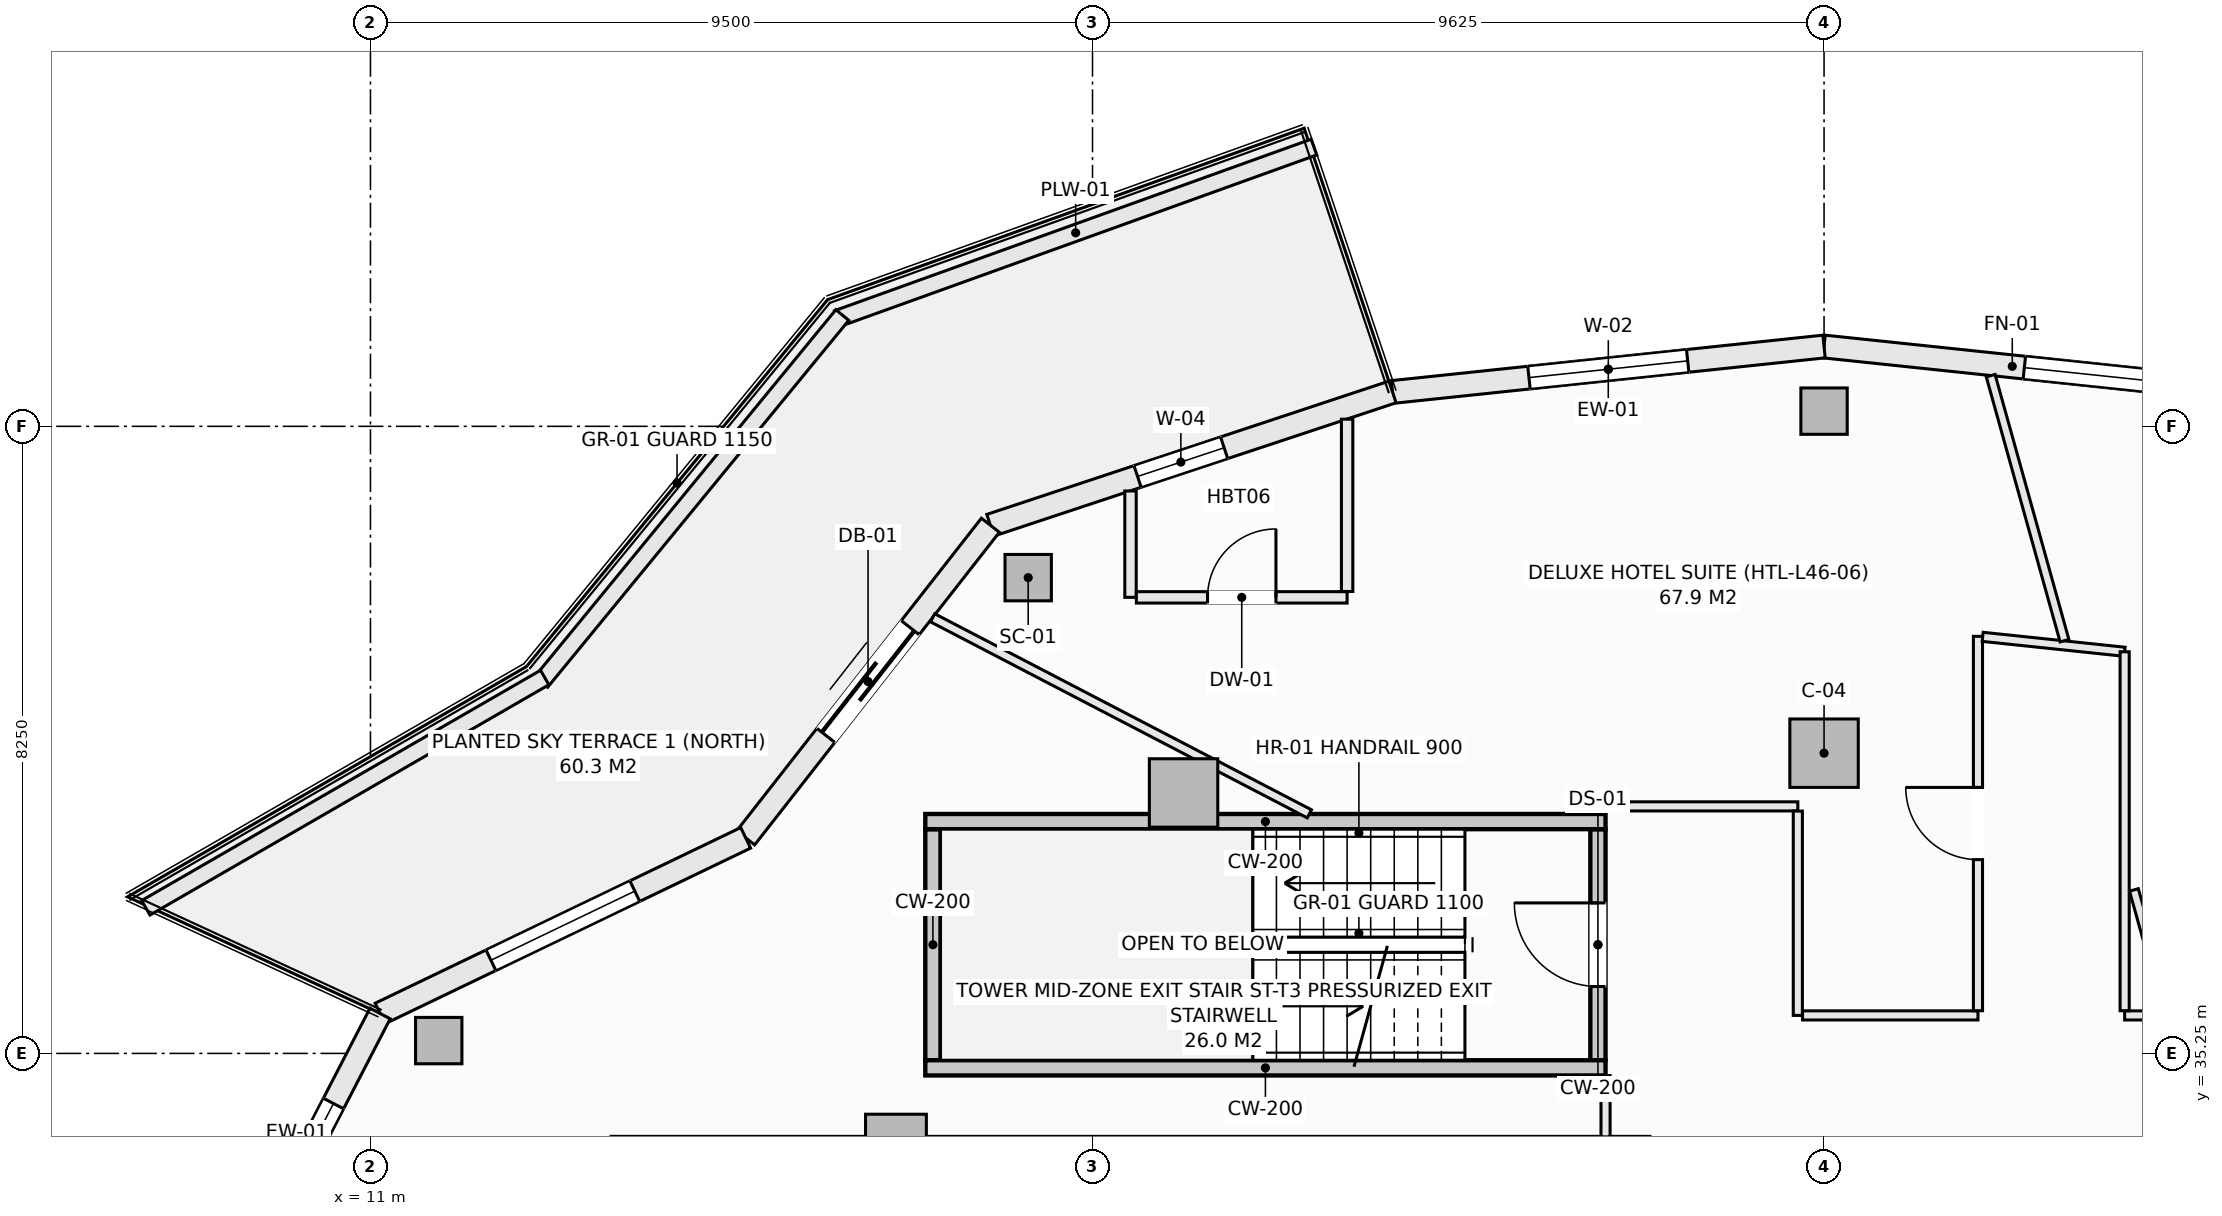
"""IFC4 building model, lengths in metres.
Left out: names, types, materials, properties, quantities, classifications, styles, units other than length and angle.
Written with IfcOpenShell. Run it as: python <this file> out.ifc"""

import sys

from ifc_helpers import new_model, si_unit, direction, frame, frame_2d, origin, origin_2d, place, context, subcontext, project, spatial, rectangle, hollow_rectangle, extrude, element, fill, save


model = new_model("IFC4")
c1 = context("Model", 3, precision=1e-05, world=origin(), true_north=direction((0.0, 1.0)))
c2 = subcontext(c1, "Body", "Model", "MODEL_VIEW")
j1 = project(units=[si_unit("LENGTHUNIT", "METRE"), si_unit("PLANEANGLEUNIT", "RADIAN")], contexts=[c1])
p1 = place(None, origin())
s1 = spatial("IfcSite", under=j1, at=p1, CompositionType="ELEMENT")
p2 = place(p1, origin())
s2 = spatial("IfcBuilding", under=s1, at=p2, CompositionType="ELEMENT")
p3 = place(p2, frame((0.0, 0.0, 176.7)))
s3 = spatial("IfcBuildingStorey", under=s2, at=p3, CompositionType="ELEMENT", Elevation=176.7)
for number, where, z_axis, x_axis in (
    (1, (30.125, 43.7, -0.27), (0.0, 0.0, 1.0), (1.0, 0.0, 0.0)),
    (2, (19.654, 41.51, -0.27), (0.0, 0.0, 1.0), (1.0, 0.0, 0.0)),
    (3, (11.898, 35.419, -0.27), (0.0, 0.0, 1.0), (1.0, 0.0, 0.0)),
):
    element("IfcColumn", number, at=place(p3, frame(where, z_axis=z_axis, x_axis=x_axis)), inside=s3, PredefinedType="COLUMN", context=c2, shape_type="SweptSolid", body=[
        extrude(hollow_rectangle(XDim=0.61, YDim=0.61, WallThickness=0.025, at=origin_2d()), origin(), (0.0, 0.0, 1.0), 3.4),
    ])
for number, where, z_axis, x_axis in (
    (4, (30.125, 39.2, -0.27), (0.0, 0.0, 1.0), (1.0, 0.0, 0.0)),
    (5, (21.698, 38.677, -0.27), (0.0, 0.0, 1.0), (1.0, 0.0, 0.0)),
):
    element("IfcColumn", number, at=place(p3, frame(where, z_axis=z_axis, x_axis=x_axis)), inside=s3, PredefinedType="COLUMN", context=c2, shape_type="SweptSolid", body=[
        extrude(rectangle(XDim=0.9, YDim=0.9, at=origin_2d()), origin(), (0.0, 0.0, 1.0), 3.4),
    ])
p4 = place(p3, frame((17.914, 34.05, -0.27), z_axis=(0.0, 0.0, 1.0), x_axis=(1.0, 0.0, 0.0)))
e6 = element("IfcColumn", 6, at=p4, inside=s3, PredefinedType="PILASTER", context=c2, shape_type="SweptSolid", body=[
    extrude(rectangle(XDim=0.8, YDim=0.8, at=origin_2d()), origin(), (0.0, 0.0, 1.0), 3.4),
])
p5 = place(p3, frame((30.125, 44.55, 0.0), z_axis=(0.0, 0.0, 1.0), x_axis=(0.994496545245, -0.104769372887, 0.0)))
e7 = element("IfcWall", 7, at=p5, inside=s3, PredefinedType="SOLIDWALL", context=c2, shape_type="SweptSolid", body=[
    extrude(rectangle(XDim=5.709, YDim=0.3, at=frame_2d((2.854, 0.0))), origin(), (0.0, 0.0, 1.0), 2.653),
])
p6 = place(p5, frame((2.65, 0.0, 0.74)))
e8 = element("IfcOpeningElement", 8, at=p6, cuts=e7, PredefinedType="OPENING", context=c2, shape_type="SweptSolid", body=[
    extrude(rectangle(XDim=2.1, YDim=1.7, at=frame_2d((1.05, 0.85))), frame((0.0, 0.16, 0.0), z_axis=(0.0, -1.0, 0.0), x_axis=(1.0, 0.0, 0.0)), (0.0, 0.0, 1.0), 0.32),
])
p7 = place(p3, frame((24.447, 43.952, 0.0), z_axis=(0.0, 0.0, 1.0), x_axis=(0.994496545245, 0.104769372887, 0.0)))
e9 = element("IfcWall", 9, at=p7, inside=s3, PredefinedType="SOLIDWALL", context=c2, shape_type="SweptSolid", body=[
    extrude(rectangle(XDim=5.709, YDim=0.3, at=frame_2d((2.854, 0.0))), origin(), (0.0, 0.0, 1.0), 2.653),
])
p8 = place(p7, frame((1.805, 0.0, 0.74)))
e10 = element("IfcOpeningElement", 10, at=p8, cuts=e9, PredefinedType="OPENING", context=c2, shape_type="SweptSolid", body=[
    extrude(rectangle(XDim=2.1, YDim=1.7, at=frame_2d((1.05, 0.85))), frame((0.0, 0.16, 0.0), z_axis=(0.0, -1.0, 0.0), x_axis=(1.0, 0.0, 0.0)), (0.0, 0.0, 1.0), 0.32),
])
p9 = place(p3, frame((19.156, 42.199, 0.0), z_axis=(0.0, 0.0, 1.0), x_axis=(0.949246811547, 0.314532177636, 0.0)))
e11 = element("IfcWall", 11, at=p9, inside=s3, PredefinedType="SOLIDWALL", context=c2, shape_type="SweptSolid", body=[
    extrude(rectangle(XDim=5.574, YDim=0.3, at=frame_2d((2.787, 0.0))), origin(), (0.0, 0.0, 1.0), 2.653),
])
p10 = place(p9, frame((2.04, 0.0, 0.72)))
e12 = element("IfcOpeningElement", 12, at=p10, cuts=e11, PredefinedType="OPENING", context=c2, shape_type="SweptSolid", body=[
    extrude(rectangle(XDim=1.2, YDim=1.65, at=frame_2d((0.6, 0.825))), frame((0.0, 0.16, 0.0), z_axis=(0.0, -1.0, 0.0), x_axis=(1.0, 0.0, 0.0)), (0.0, 0.0, 1.0), 0.32),
])
p11 = place(p3, frame((15.937, 38.086, 0.0), z_axis=(0.0, 0.0, 1.0), x_axis=(0.616429245738, 0.787410302828, 0.0)))
e13 = element("IfcWall", 13, at=p11, inside=s3, PredefinedType="SOLIDWALL", context=c2, shape_type="SweptSolid", body=[
    extrude(rectangle(XDim=5.223, YDim=0.3, at=frame_2d((2.612, 0.0))), origin(), (0.0, 0.0, 1.0), 2.653),
])
p12 = place(p11, frame((1.712, 0.0, 0.0)))
e14 = element("IfcOpeningElement", 14, at=p12, cuts=e13, PredefinedType="OPENING", context=c2, shape_type="SweptSolid", body=[
    extrude(rectangle(XDim=1.8, YDim=2.25, at=frame_2d((0.9, 1.125))), frame((0.0, 0.16, 0.0), z_axis=(0.0, -1.0, 0.0), x_axis=(1.0, 0.0, 0.0)), (0.0, 0.0, 1.0), 0.32),
])
p13 = place(p3, frame((11.127, 35.775, 0.0), z_axis=(0.0, 0.0, 1.0), x_axis=(0.901353070301, 0.433085029363, 0.0)))
e15 = element("IfcWall", 15, at=p13, inside=s3, PredefinedType="SOLIDWALL", context=c2, shape_type="SweptSolid", body=[
    extrude(rectangle(XDim=5.336, YDim=0.3, at=frame_2d((2.668, 0.0))), origin(), (0.0, 0.0, 1.0), 2.653),
])
p14 = place(p13, frame((1.618, 0.0, 0.74)))
e16 = element("IfcOpeningElement", 16, at=p14, cuts=e15, PredefinedType="OPENING", context=c2, shape_type="SweptSolid", body=[
    extrude(rectangle(XDim=2.1, YDim=1.7, at=frame_2d((1.05, 0.85))), frame((0.0, 0.16, 0.0), z_axis=(0.0, -1.0, 0.0), x_axis=(1.0, 0.0, 0.0)), (0.0, 0.0, 1.0), 0.32),
])
p15 = place(p3, frame((8.935, 31.542, 0.0), z_axis=(0.0, 0.0, 1.0), x_axis=(0.459810251451, 0.888017191647, 0.0)))
e17 = element("IfcWall", 17, at=p15, inside=s3, PredefinedType="SOLIDWALL", context=c2, shape_type="SweptSolid", body=[
    extrude(rectangle(XDim=4.766, YDim=0.3, at=frame_2d((2.383, 0.0))), origin(), (0.0, 0.0, 1.0), 2.653),
])
p16 = place(p15, frame((1.333, 0.0, 0.74)))
e18 = element("IfcOpeningElement", 18, at=p16, cuts=e17, PredefinedType="OPENING", context=c2, shape_type="SweptSolid", body=[
    extrude(rectangle(XDim=2.1, YDim=1.7, at=frame_2d((1.05, 0.85))), frame((0.0, 0.16, 0.0), z_axis=(0.0, -1.0, 0.0), x_axis=(1.0, 0.0, 0.0)), (0.0, 0.0, 1.0), 0.32),
])
p17 = place(p3, frame((17.143, 44.918, 0.0), z_axis=(0.0, 0.0, 1.0), x_axis=(0.94094437769, 0.33856118811, 0.0)))
e19 = element("IfcWall", 19, at=p17, inside=s3, PredefinedType="PARAPET", context=c2, shape_type="SweptSolid", body=[
    extrude(rectangle(XDim=6.664, YDim=0.22, at=frame_2d((3.332, 0.0))), origin(), (0.0, 0.0, 1.0), 0.52),
])
p18 = place(p3, frame((13.246, 40.137, 0.0), z_axis=(0.0, 0.0, 1.0), x_axis=(0.634429234628, 0.77298094818, 0.0)))
e20 = element("IfcWall", 20, at=p18, inside=s3, PredefinedType="PARAPET", context=c2, shape_type="SweptSolid", body=[
    extrude(rectangle(XDim=6.245, YDim=0.22, at=frame_2d((3.123, 0.0))), origin(), (0.0, 0.0, 1.0), 0.52),
])
p19 = place(p3, frame((8.044, 37.166, 0.0), z_axis=(0.0, 0.0, 1.0), x_axis=(0.866058128659, 0.499943314571, 0.0)))
e21 = element("IfcWall", 21, at=p19, inside=s3, PredefinedType="PARAPET", context=c2, shape_type="SweptSolid", body=[
    extrude(rectangle(XDim=6.06, YDim=0.22, at=frame_2d((3.03, 0.0))), origin(), (0.0, 0.0, 1.0), 0.52),
])
p20 = place(p3, frame((27.15, 35.16, -0.27), z_axis=(0.0, 0.0, 1.0), x_axis=(0.0, 1.0, 0.0)))
e22 = element("IfcWall", 22, at=p20, inside=s3, PredefinedType="SHEAR", context=c2, shape_type="SweptSolid", body=[
    extrude(rectangle(XDim=3.04, YDim=0.2, at=frame_2d((1.52, 0.0))), origin(), (0.0, 0.0, 1.0), 3.4),
])
p21 = place(p20, frame((0.97, 0.0, 0.27)))
e23 = element("IfcOpeningElement", 23, at=p21, cuts=e22, PredefinedType="OPENING", context=c2, shape_type="SweptSolid", body=[
    extrude(rectangle(XDim=1.1, YDim=2.15, at=frame_2d((0.55, 1.075))), frame((0.0, 0.11, 0.0), z_axis=(0.0, -1.0, 0.0), x_axis=(1.0, 0.0, 0.0)), (0.0, 0.0, 1.0), 0.22),
])
p22 = place(p3, frame((18.4, 35.16, -0.27), z_axis=(0.0, 0.0, 1.0), x_axis=(0.0, 1.0, 0.0)))
e24 = element("IfcWall", 24, at=p22, inside=s3, PredefinedType="SHEAR", context=c2, shape_type="SweptSolid", body=[
    extrude(rectangle(XDim=3.04, YDim=0.2, at=frame_2d((1.52, 0.0))), origin(), (0.0, 0.0, 1.0), 3.4),
])
for number, where, z_axis, x_axis in (
    (25, (18.3, 38.3, -0.27), (0.0, 0.0, 1.0), (1.0, 0.0, 0.0)),
    (26, (18.3, 35.06, -0.27), (0.0, 0.0, 1.0), (1.0, 0.0, 0.0)),
):
    element("IfcWall", number, at=place(p3, frame(where, z_axis=z_axis, x_axis=x_axis)), inside=s3, PredefinedType="SHEAR", context=c2, shape_type="SweptSolid", body=[
        extrude(rectangle(XDim=8.95, YDim=0.2, at=frame_2d((4.475, 0.0))), origin(), (0.0, 0.0, 1.0), 3.4),
    ])
p23 = place(p3, frame((27.25, 34.152, 0.0), z_axis=(0.0, 0.0, 1.0), x_axis=(0.0, 1.0, 0.0)))
e27 = element("IfcWall", 27, at=p23, inside=s3, PredefinedType="PARTITIONING", context=c2, shape_type="SweptSolid", body=[
    extrude(rectangle(XDim=0.806, YDim=0.12, at=frame_2d((0.403, 0.0))), origin(), (0.0, 0.0, 1.0), 3.13),
])
p24 = place(p3, frame((27.25, 38.5, 0.0), z_axis=(0.0, 0.0, 1.0), x_axis=(1.0, 0.0, 0.0)))
e28 = element("IfcWall", 28, at=p24, inside=s3, PredefinedType="PARTITIONING", context=c2, shape_type="SweptSolid", body=[
    extrude(rectangle(XDim=2.53, YDim=0.12, at=frame_2d((1.265, 0.0))), origin(), (0.0, 0.0, 1.0), 3.13),
])
p25 = place(p3, frame((29.78, 35.75, 0.0), z_axis=(0.0, 0.0, 1.0), x_axis=(0.0, 1.0, 0.0)))
e29 = element("IfcWall", 29, at=p25, inside=s3, PredefinedType="PARTITIONING", context=c2, shape_type="SweptSolid", body=[
    extrude(rectangle(XDim=2.688, YDim=0.12, at=frame_2d((1.344, 0.0))), origin(), (0.0, 0.0, 1.0), 3.13),
])
p26 = place(p3, frame((29.842, 35.75, 0.0), z_axis=(0.0, 0.0, 1.0), x_axis=(1.0, 0.0, 0.0)))
e30 = element("IfcWall", 30, at=p26, inside=s3, PredefinedType="PARTITIONING", context=c2, shape_type="SweptSolid", body=[
    extrude(rectangle(XDim=2.308, YDim=0.12, at=frame_2d((1.154, 0.0))), origin(), (0.0, 0.0, 1.0), 3.13),
])
p27 = place(p3, frame((34.08, 35.75, 0.0), z_axis=(0.0, 0.0, 1.0), x_axis=(1.0, 0.0, 0.0)))
e31 = element("IfcWall", 31, at=p27, inside=s3, PredefinedType="PARTITIONING", context=c2, shape_type="SweptSolid", body=[
    extrude(rectangle(XDim=4.878, YDim=0.12, at=frame_2d((2.439, 0.0))), origin(), (0.0, 0.0, 1.0), 2.505),
])
p28 = place(p27, frame((1.485, 0.0, 0.0)))
e32 = element("IfcOpeningElement", 32, at=p28, cuts=e31, PredefinedType="OPENING", context=c2, shape_type="SweptSolid", body=[
    extrude(rectangle(XDim=0.95, YDim=2.1, at=frame_2d((0.475, 1.05))), frame((0.0, 0.07, 0.0), z_axis=(0.0, -1.0, 0.0), x_axis=(1.0, 0.0, 0.0)), (0.0, 0.0, 1.0), 0.14),
])
p29 = place(p3, frame((32.15, 35.812, 0.0), z_axis=(0.0, 0.0, 1.0), x_axis=(0.0, 1.0, 0.0)))
e33 = element("IfcWall", 33, at=p29, inside=s3, PredefinedType="PARTITIONING", context=c2, shape_type="SweptSolid", body=[
    extrude(rectangle(XDim=4.925, YDim=0.12, at=frame_2d((2.462, 0.0))), origin(), (0.0, 0.0, 1.0), 3.13),
])
p30 = place(p29, frame((1.988, 0.0, 0.0)))
e34 = element("IfcOpeningElement", 34, at=p30, cuts=e33, PredefinedType="OPENING", context=c2, shape_type="SweptSolid", body=[
    extrude(rectangle(XDim=0.95, YDim=2.1, at=frame_2d((0.475, 1.05))), frame((0.0, 0.07, 0.0), z_axis=(0.0, -1.0, 0.0), x_axis=(1.0, 0.0, 0.0)), (0.0, 0.0, 1.0), 0.14),
])
p31 = place(p3, frame((32.212, 40.73, 0.0), z_axis=(0.0, 0.0, 1.0), x_axis=(0.994511860417, -0.104623895405, 0.0)))
e35 = element("IfcWall", 35, at=p31, inside=s3, PredefinedType="PARTITIONING", context=c2, shape_type="SweptSolid", body=[
    extrude(rectangle(XDim=1.878, YDim=0.12, at=frame_2d((0.939, 0.0))), origin(), (0.0, 0.0, 1.0), 3.13),
])
p32 = place(p3, frame((34.08, 35.812, 0.0), z_axis=(0.0, 0.0, 1.0), x_axis=(0.0, 1.0, 0.0)))
e36 = element("IfcWall", 36, at=p32, inside=s3, PredefinedType="PARTITIONING", context=c2, shape_type="SweptSolid", body=[
    extrude(rectangle(XDim=4.722, YDim=0.12, at=frame_2d((2.361, 0.0))), origin(), (0.0, 0.0, 1.0), 2.812),
])
p33 = place(p3, frame((18.396, 40.981, 0.0), z_axis=(0.0, 0.0, 1.0), x_axis=(0.887120213162, -0.461538435452, 0.0)))
e37 = element("IfcWall", 37, at=p33, inside=s3, PredefinedType="PARTITIONING", context=c2, shape_type="SweptSolid", body=[
    extrude(rectangle(XDim=5.588, YDim=0.12, at=frame_2d((2.794, 0.0))), origin(), (0.0, 0.0, 1.0), 2.505),
])
p34 = place(p3, frame((32.317, 44.166, 0.0), z_axis=(0.0, 0.0, 1.0), x_axis=(0.268461316047, -0.963290465948, 0.0)))
e38 = element("IfcWall", 38, at=p34, inside=s3, PredefinedType="PARTITIONING", context=c2, shape_type="SweptSolid", body=[
    extrude(rectangle(XDim=3.619, YDim=0.12, at=frame_2d((1.81, 0.0))), origin(), (0.0, 0.0, 1.0), 3.13),
])
p35 = place(p3, frame((34.202, 37.401, 0.0), z_axis=(0.0, 0.0, 1.0), x_axis=(0.268460489063, -0.963290696422, 0.0)))
e39 = element("IfcWall", 39, at=p35, inside=s3, PredefinedType="PARTITIONING", context=c2, shape_type="SweptSolid", body=[
    extrude(rectangle(XDim=1.65, YDim=0.12, at=frame_2d((0.825, 0.0))), origin(), (0.0, 0.0, 1.0), 3.13),
])
p36 = place(p3, frame((21.0, 41.25, 0.0), z_axis=(0.0, 0.0, 1.0), x_axis=(0.0, 1.0, 0.0)))
e40 = element("IfcWall", 40, at=p36, inside=s3, PredefinedType="PARTITIONING", context=c2, shape_type="SweptSolid", body=[
    extrude(rectangle(XDim=1.399, YDim=0.15, at=frame_2d((0.7, 0.0))), origin(), (0.0, 0.0, 1.0), 3.13),
])
p37 = place(p3, frame((21.077, 41.25, 0.0), z_axis=(0.0, 0.0, 1.0), x_axis=(1.0, 0.0, 0.0)))
e41 = element("IfcWall", 41, at=p37, inside=s3, PredefinedType="PARTITIONING", context=c2, shape_type="SweptSolid", body=[
    extrude(rectangle(XDim=2.773, YDim=0.15, at=frame_2d((1.387, 0.0))), origin(), (0.0, 0.0, 1.0), 3.13),
])
p38 = place(p37, frame((0.937, 0.0, 0.0)))
e42 = element("IfcOpeningElement", 42, at=p38, cuts=e41, PredefinedType="OPENING", context=c2, shape_type="SweptSolid", body=[
    extrude(rectangle(XDim=0.9, YDim=2.1, at=frame_2d((0.45, 1.05))), frame((0.0, 0.085, 0.0), z_axis=(0.0, -1.0, 0.0), x_axis=(1.0, 0.0, 0.0)), (0.0, 0.0, 1.0), 0.17),
])
p39 = place(p3, frame((23.85, 41.327, 0.0), z_axis=(0.0, 0.0, 1.0), x_axis=(0.0, 1.0, 0.0)))
e43 = element("IfcWall", 43, at=p39, inside=s3, PredefinedType="PARTITIONING", context=c2, shape_type="SweptSolid", body=[
    extrude(rectangle(XDim=2.267, YDim=0.15, at=frame_2d((1.134, 0.0))), origin(), (0.0, 0.0, 1.0), 3.13),
])
p40 = place(p6, origin())
e44 = element("IfcWindow", 44, at=p40, inside=s3, PartitioningType="SINGLE_PANEL", PredefinedType="WINDOW", context=c2, shape_type="SweptSolid", body=[
    extrude(rectangle(XDim=2.1, YDim=1.7, at=frame_2d((1.05, 0.85))), frame((0.0, 0.03, 0.0), z_axis=(0.0, -1.0, 0.0), x_axis=(1.0, 0.0, 0.0)), (0.0, 0.0, 1.0), 0.06),
])
fill(e8, e44)
p41 = place(p8, origin())
e45 = element("IfcWindow", 45, at=p41, inside=s3, PartitioningType="SINGLE_PANEL", PredefinedType="WINDOW", context=c2, shape_type="SweptSolid", body=[
    extrude(rectangle(XDim=2.1, YDim=1.7, at=frame_2d((1.05, 0.85))), frame((0.0, 0.03, 0.0), z_axis=(0.0, -1.0, 0.0), x_axis=(1.0, 0.0, 0.0)), (0.0, 0.0, 1.0), 0.06),
])
fill(e10, e45)
p42 = place(p10, origin())
e46 = element("IfcWindow", 46, at=p42, inside=s3, PartitioningType="SINGLE_PANEL", PredefinedType="WINDOW", context=c2, shape_type="SweptSolid", body=[
    extrude(rectangle(XDim=1.2, YDim=1.65, at=frame_2d((0.6, 0.825))), frame((0.0, 0.03, 0.0), z_axis=(0.0, -1.0, 0.0), x_axis=(1.0, 0.0, 0.0)), (0.0, 0.0, 1.0), 0.06),
])
fill(e12, e46)
p43 = place(p12, origin())
e47 = element("IfcDoor", 47, at=p43, inside=s3, OperationType="SLIDING_TO_LEFT", PredefinedType="DOOR", context=c2, shape_type="SweptSolid", body=[
    extrude(rectangle(XDim=1.8, YDim=2.25, at=frame_2d((0.9, 1.125))), frame((0.0, 0.025, 0.0), z_axis=(0.0, -1.0, 0.0), x_axis=(1.0, 0.0, 0.0)), (0.0, 0.0, 1.0), 0.05),
])
fill(e14, e47)
p44 = place(p14, origin())
e48 = element("IfcWindow", 48, at=p44, inside=s3, PartitioningType="SINGLE_PANEL", PredefinedType="WINDOW", context=c2, shape_type="SweptSolid", body=[
    extrude(rectangle(XDim=2.1, YDim=1.7, at=frame_2d((1.05, 0.85))), frame((0.0, 0.03, 0.0), z_axis=(0.0, -1.0, 0.0), x_axis=(1.0, 0.0, 0.0)), (0.0, 0.0, 1.0), 0.06),
])
fill(e16, e48)
p45 = place(p16, origin())
e49 = element("IfcWindow", 49, at=p45, inside=s3, PartitioningType="SINGLE_PANEL", PredefinedType="WINDOW", context=c2, shape_type="SweptSolid", body=[
    extrude(rectangle(XDim=2.1, YDim=1.7, at=frame_2d((1.05, 0.85))), frame((0.0, 0.03, 0.0), z_axis=(0.0, -1.0, 0.0), x_axis=(1.0, 0.0, 0.0)), (0.0, 0.0, 1.0), 0.06),
])
fill(e18, e49)
p46 = place(p21, origin())
e50 = element("IfcDoor", 50, at=p46, inside=s3, OperationType="SINGLE_SWING_RIGHT", PredefinedType="DOOR", context=c2, shape_type="SweptSolid", body=[
    extrude(rectangle(XDim=1.1, YDim=2.15, at=frame_2d((0.55, 1.075))), frame((0.0, 0.025, 0.0), z_axis=(0.0, -1.0, 0.0), x_axis=(1.0, 0.0, 0.0)), (0.0, 0.0, 1.0), 0.05),
])
fill(e23, e50)
p47 = place(p30, origin())
e51 = element("IfcDoor", 51, at=p47, inside=s3, OperationType="SINGLE_SWING_RIGHT", PredefinedType="DOOR", context=c2, shape_type="SweptSolid", body=[
    extrude(rectangle(XDim=0.95, YDim=2.1, at=frame_2d((0.475, 1.05))), frame((0.0, 0.025, 0.0), z_axis=(0.0, -1.0, 0.0), x_axis=(1.0, 0.0, 0.0)), (0.0, 0.0, 1.0), 0.05),
])
fill(e34, e51)
p48 = place(p38, origin())
e52 = element("IfcDoor", 52, at=p48, inside=s3, OperationType="SINGLE_SWING_RIGHT", PredefinedType="DOOR", context=c2, shape_type="SweptSolid", body=[
    extrude(rectangle(XDim=0.9, YDim=2.1, at=frame_2d((0.45, 1.05))), frame((0.0, 0.025, 0.0), z_axis=(0.0, -1.0, 0.0), x_axis=(1.0, 0.0, 0.0)), (0.0, 0.0, 1.0), 0.05),
])
fill(e42, e52)
save(model, sys.argv[1])
